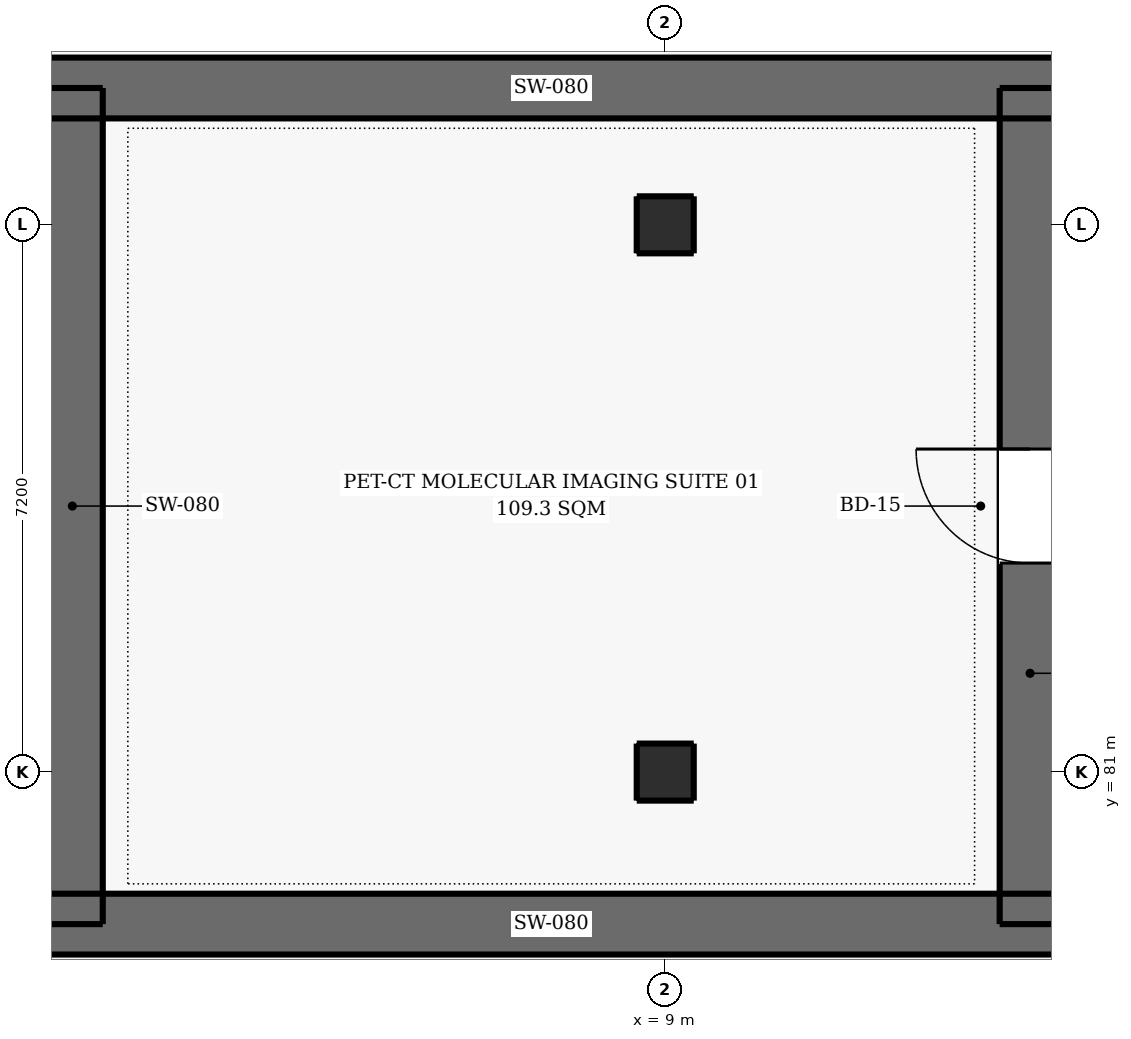
"""IFC4 building model, lengths in metres.
Left out: names, types, materials, properties, quantities, classifications, styles, units other than length and angle.
Written with IfcOpenShell. Run it as: python <this file> out.ifc"""

import sys

from ifc_helpers import new_model, si_unit, direction, frame, frame_2d, origin, origin_2d, place, context, subcontext, project, spatial, rectangle, extrude, element, fill, save


model = new_model("IFC4")
c1 = context("Model", 3, precision=1e-05, world=origin(), true_north=direction((0.0, 1.0)))
c2 = subcontext(c1, "Body", "Model", "MODEL_VIEW")
j1 = project(units=[si_unit("LENGTHUNIT", "METRE"), si_unit("PLANEANGLEUNIT", "RADIAN")], contexts=[c1])
p1 = place(None, origin())
s1 = spatial("IfcSite", under=j1, at=p1, CompositionType="ELEMENT")
p2 = place(p1, origin())
s2 = spatial("IfcBuilding", under=s1, at=p2, CompositionType="ELEMENT")
p3 = place(p2, frame((0.0, 0.0, -4.8)))
s3 = spatial("IfcBuildingStorey", under=s2, at=p3, CompositionType="ELEMENT", Elevation=-4.8)
for number, where, z_axis, x_axis in (
    (1, (9.0, 81.0, 0.0), (0.0, 0.0, 1.0), (1.0, 0.0, 0.0)),
    (2, (9.0, 88.2, 0.0), (0.0, 0.0, 1.0), (1.0, 0.0, 0.0)),
):
    element("IfcColumn", number, at=place(p3, frame(where, z_axis=z_axis, x_axis=x_axis)), inside=s3, PredefinedType="COLUMN", context=c2, shape_type="SweptSolid", body=[
        extrude(rectangle(XDim=0.75, YDim=0.75, at=origin_2d()), origin(), (0.0, 0.0, 1.0), 4.8),
    ])
for number, where, z_axis, x_axis in (
    (3, (0.8, 79.0, 0.0), (0.0, 0.0, 1.0), (1.0, 0.0, 0.0)),
    (4, (0.8, 90.0, 0.0), (0.0, 0.0, 1.0), (1.0, 0.0, 0.0)),
):
    element("IfcWall", number, at=place(p3, frame(where, z_axis=z_axis, x_axis=x_axis)), inside=s3, PredefinedType="SOLIDWALL", context=c2, shape_type="SweptSolid", body=[
        extrude(rectangle(XDim=13.4, YDim=0.8, at=frame_2d((6.7, 0.0))), origin(), (0.0, 0.0, 1.0), 4.5),
    ])
p4 = place(p3, frame((1.2, 79.0, 0.0), z_axis=(0.0, 0.0, 1.0), x_axis=(0.0, 1.0, 0.0)))
e5 = element("IfcWall", 5, at=p4, inside=s3, PredefinedType="SOLIDWALL", context=c2, shape_type="SweptSolid", body=[
    extrude(rectangle(XDim=11.0, YDim=0.8, at=frame_2d((5.5, 0.0))), origin(), (0.0, 0.0, 1.0), 4.5),
])
p5 = place(p3, frame((13.8, 79.0, 0.0), z_axis=(0.0, 0.0, 1.0), x_axis=(0.0, 1.0, 0.0)))
e6 = element("IfcWall", 6, at=p5, inside=s3, PredefinedType="SOLIDWALL", context=c2, shape_type="SweptSolid", body=[
    extrude(rectangle(XDim=11.0, YDim=0.8, at=frame_2d((5.5, 0.0))), origin(), (0.0, 0.0, 1.0), 4.5),
])
p6 = place(p5, frame((4.75, 0.0, 0.0)))
e7 = element("IfcOpeningElement", 7, at=p6, cuts=e6, PredefinedType="OPENING", context=c2, shape_type="SweptSolid", body=[
    extrude(rectangle(XDim=1.5, YDim=2.25, at=frame_2d((0.75, 1.125))), frame((0.0, 0.41, 0.0), z_axis=(0.0, -1.0, 0.0), x_axis=(1.0, 0.0, 0.0)), (0.0, 0.0, 1.0), 0.82),
])
p7 = place(p6, origin())
e8 = element("IfcDoor", 8, at=p7, inside=s3, OperationType="SINGLE_SWING_RIGHT", PredefinedType="DOOR", context=c2, shape_type="SweptSolid", body=[
    extrude(rectangle(XDim=1.5, YDim=2.25, at=frame_2d((0.75, 1.125))), frame((0.0, 0.025, 0.0), z_axis=(0.0, -1.0, 0.0), x_axis=(1.0, 0.0, 0.0)), (0.0, 0.0, 1.0), 0.05),
])
fill(e7, e8)
save(model, sys.argv[1])
